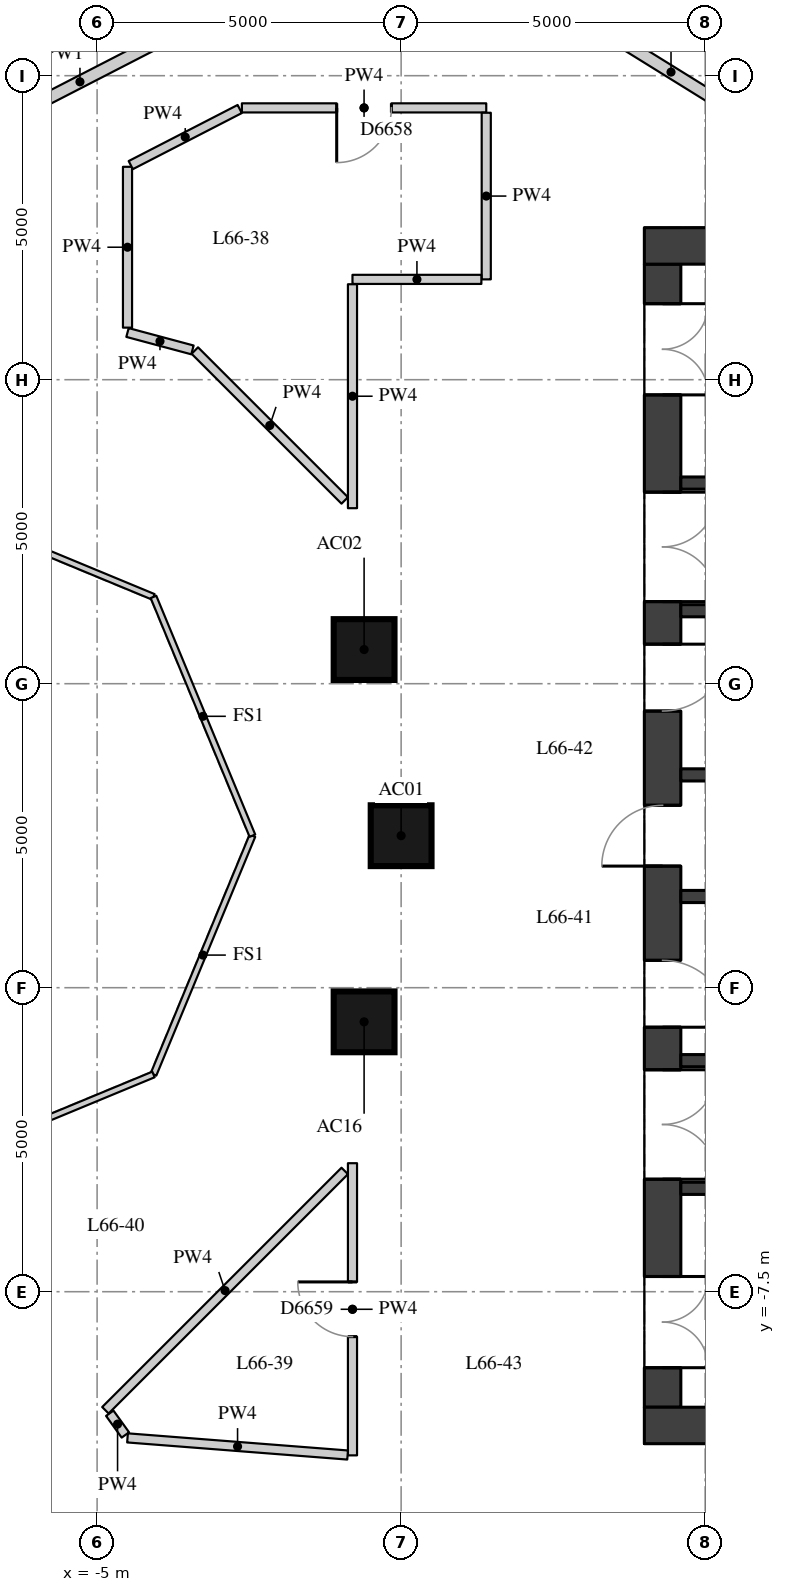
"""IFC4 building model, lengths in metres.
Left out: names, types, materials, properties, quantities, classifications, styles, units other than length and angle.
Written with IfcOpenShell. Run it as: python <this file> out.ifc"""

import sys

from ifc_helpers import new_model, si_unit, direction, frame, frame_2d, origin, origin_2d, place, context, subcontext, project, spatial, rectangle, extrude, element, fill, save


model = new_model("IFC4")
c1 = context("Model", 3, precision=1e-05, world=origin(), true_north=direction((0.0, 1.0)))
c2 = subcontext(c1, "Body", "Model", "MODEL_VIEW")
j1 = project(units=[si_unit("LENGTHUNIT", "METRE"), si_unit("PLANEANGLEUNIT", "RADIAN")], contexts=[c1])
p1 = place(None, origin())
s1 = spatial("IfcSite", under=j1, at=p1, CompositionType="ELEMENT")
p2 = place(p1, origin())
s2 = spatial("IfcBuilding", under=s1, at=p2, CompositionType="ELEMENT")
p3 = place(p2, frame((0.0, 0.0, 233.3)))
s3 = spatial("IfcBuildingStorey", under=s2, at=p3, CompositionType="ELEMENT", Elevation=233.3)
for number, where, z_axis, x_axis in (
    (1, (0.0, 0.0, 0.0), (0.0, 0.0, 1.0), (1.0, 0.0, 0.0)),
    (2, (-0.609, 3.062, 0.0), (0.0, 0.0, 1.0), (1.0, 0.0, 0.0)),
    (3, (-0.609, -3.062, 0.0), (0.0, 0.0, 1.0), (1.0, 0.0, 0.0)),
):
    element("IfcColumn", number, at=place(p3, frame(where, z_axis=z_axis, x_axis=x_axis)), inside=s3, PredefinedType="COLUMN", context=c2, shape_type="SweptSolid", body=[
        extrude(rectangle(XDim=1.0, YDim=1.0, at=origin_2d()), origin(), (0.0, 0.0, 1.0), 3.3),
    ])
p4 = place(p3, frame((4.3, -9.4, 0.0), z_axis=(0.0, 0.0, 1.0), x_axis=(0.0, 1.0, 0.0)))
e4 = element("IfcWall", 4, at=p4, inside=s3, PredefinedType="SHEAR", context=c2, shape_type="SweptSolid", body=[
    extrude(rectangle(XDim=18.8, YDim=0.6, at=frame_2d((9.4, 0.0))), origin(), (0.0, 0.0, 1.0), 3.02),
])
p5 = place(p4, frame((0.65, 0.0, 0.0)))
e5 = element("IfcOpeningElement", 5, at=p5, cuts=e4, PredefinedType="OPENING", context=c2, shape_type="SweptSolid", body=[
    extrude(rectangle(XDim=1.5, YDim=2.1, at=frame_2d((0.75, 1.05))), frame((0.0, 0.31, 0.0), z_axis=(0.0, -1.0, 0.0), x_axis=(1.0, 0.0, 0.0)), (0.0, 0.0, 1.0), 0.62),
])
p6 = place(p4, frame((3.75, 0.0, 0.0)))
e6 = element("IfcOpeningElement", 6, at=p6, cuts=e4, PredefinedType="OPENING", context=c2, shape_type="SweptSolid", body=[
    extrude(rectangle(XDim=1.8, YDim=2.1, at=frame_2d((0.9, 1.05))), frame((0.0, 0.31, 0.0), z_axis=(0.0, -1.0, 0.0), x_axis=(1.0, 0.0, 0.0)), (0.0, 0.0, 1.0), 0.62),
])
p7 = place(p4, frame((6.25, 0.0, 0.0)))
e7 = element("IfcOpeningElement", 7, at=p7, cuts=e4, PredefinedType="OPENING", context=c2, shape_type="SweptSolid", body=[
    extrude(rectangle(XDim=1.1, YDim=2.1, at=frame_2d((0.55, 1.05))), frame((0.0, 0.31, 0.0), z_axis=(0.0, -1.0, 0.0), x_axis=(1.0, 0.0, 0.0)), (0.0, 0.0, 1.0), 0.62),
])
p8 = place(p4, frame((8.9, 0.0, 0.0)))
e8 = element("IfcOpeningElement", 8, at=p8, cuts=e4, PredefinedType="OPENING", context=c2, shape_type="SweptSolid", body=[
    extrude(rectangle(XDim=1.0, YDim=2.1, at=frame_2d((0.5, 1.05))), frame((0.0, 0.31, 0.0), z_axis=(0.0, -1.0, 0.0), x_axis=(1.0, 0.0, 0.0)), (0.0, 0.0, 1.0), 0.62),
])
p9 = place(p4, frame((11.45, 0.0, 0.0)))
e9 = element("IfcOpeningElement", 9, at=p9, cuts=e4, PredefinedType="OPENING", context=c2, shape_type="SweptSolid", body=[
    extrude(rectangle(XDim=1.1, YDim=2.1, at=frame_2d((0.55, 1.05))), frame((0.0, 0.31, 0.0), z_axis=(0.0, -1.0, 0.0), x_axis=(1.0, 0.0, 0.0)), (0.0, 0.0, 1.0), 0.62),
])
p10 = place(p4, frame((13.25, 0.0, 0.0)))
e10 = element("IfcOpeningElement", 10, at=p10, cuts=e4, PredefinedType="OPENING", context=c2, shape_type="SweptSolid", body=[
    extrude(rectangle(XDim=1.8, YDim=2.1, at=frame_2d((0.9, 1.05))), frame((0.0, 0.31, 0.0), z_axis=(0.0, -1.0, 0.0), x_axis=(1.0, 0.0, 0.0)), (0.0, 0.0, 1.0), 0.62),
])
p11 = place(p4, frame((16.65, 0.0, 0.0)))
e11 = element("IfcOpeningElement", 11, at=p11, cuts=e4, PredefinedType="OPENING", context=c2, shape_type="SweptSolid", body=[
    extrude(rectangle(XDim=1.5, YDim=2.1, at=frame_2d((0.75, 1.05))), frame((0.0, 0.31, 0.0), z_axis=(0.0, -1.0, 0.0), x_axis=(1.0, 0.0, 0.0)), (0.0, 0.0, 1.0), 0.62),
])
for number, where, z_axis, x_axis in (
    (12, (4.0, 9.7, 0.0), (0.0, 0.0, 1.0), (1.0, 0.0, 0.0)),
    (13, (4.0, -9.7, 0.0), (0.0, 0.0, 1.0), (1.0, 0.0, 0.0)),
):
    element("IfcWall", number, at=place(p3, frame(where, z_axis=z_axis, x_axis=x_axis)), inside=s3, PredefinedType="SHEAR", context=c2, shape_type="SweptSolid", body=[
        extrude(rectangle(XDim=12.0, YDim=0.6, at=frame_2d((6.0, 0.0))), origin(), (0.0, 0.0, 1.0), 3.02),
    ])
p12 = place(p3, frame((4.6, 5.8, 0.0), z_axis=(0.0, 0.0, 1.0), x_axis=(1.0, 0.0, 0.0)))
e14 = element("IfcWall", 14, at=p12, inside=s3, PredefinedType="SHEAR", context=c2, shape_type="SweptSolid", body=[
    extrude(rectangle(XDim=10.8, YDim=0.2, at=frame_2d((5.4, 0.0))), origin(), (0.0, 0.0, 1.0), 3.02),
])
p13 = place(p12, frame((7.05, 0.0, 0.0)))
e15 = element("IfcOpeningElement", 15, at=p13, cuts=e14, PredefinedType="OPENING", context=c2, shape_type="SweptSolid", body=[
    extrude(rectangle(XDim=1.1, YDim=2.1, at=frame_2d((0.55, 1.05))), frame((0.0, 0.11, 0.0), z_axis=(0.0, -1.0, 0.0), x_axis=(1.0, 0.0, 0.0)), (0.0, 0.0, 1.0), 0.22),
])
p14 = place(p12, frame((9.05, 0.0, 0.0)))
e16 = element("IfcOpeningElement", 16, at=p14, cuts=e14, PredefinedType="OPENING", context=c2, shape_type="SweptSolid", body=[
    extrude(rectangle(XDim=1.1, YDim=2.1, at=frame_2d((0.55, 1.05))), frame((0.0, 0.11, 0.0), z_axis=(0.0, -1.0, 0.0), x_axis=(1.0, 0.0, 0.0)), (0.0, 0.0, 1.0), 0.22),
])
p15 = place(p3, frame((4.6, 3.7, 0.0), z_axis=(0.0, 0.0, 1.0), x_axis=(1.0, 0.0, 0.0)))
e17 = element("IfcWall", 17, at=p15, inside=s3, PredefinedType="SHEAR", context=c2, shape_type="SweptSolid", body=[
    extrude(rectangle(XDim=10.8, YDim=0.2, at=frame_2d((5.4, 0.0))), origin(), (0.0, 0.0, 1.0), 3.02),
])
p16 = place(p15, frame((6.6, 0.0, 0.0)))
e18 = element("IfcOpeningElement", 18, at=p16, cuts=e17, PredefinedType="OPENING", context=c2, shape_type="SweptSolid", body=[
    extrude(rectangle(XDim=1.1, YDim=2.1, at=frame_2d((0.55, 1.05))), frame((0.0, 0.11, 0.0), z_axis=(0.0, -1.0, 0.0), x_axis=(1.0, 0.0, 0.0)), (0.0, 0.0, 1.0), 0.22),
])
p17 = place(p15, frame((8.9, 0.0, 0.0)))
e19 = element("IfcOpeningElement", 19, at=p17, cuts=e17, PredefinedType="OPENING", context=c2, shape_type="SweptSolid", body=[
    extrude(rectangle(XDim=1.1, YDim=2.1, at=frame_2d((0.55, 1.05))), frame((0.0, 0.11, 0.0), z_axis=(0.0, -1.0, 0.0), x_axis=(1.0, 0.0, 0.0)), (0.0, 0.0, 1.0), 0.22),
])
for number, where, z_axis, x_axis in (
    (20, (4.6, 1.0, 0.0), (0.0, 0.0, 1.0), (1.0, 0.0, 0.0)),
    (21, (4.6, -1.0, 0.0), (0.0, 0.0, 1.0), (1.0, 0.0, 0.0)),
):
    element("IfcWall", number, at=place(p3, frame(where, z_axis=z_axis, x_axis=x_axis)), inside=s3, PredefinedType="SHEAR", context=c2, shape_type="SweptSolid", body=[
        extrude(rectangle(XDim=10.8, YDim=0.2, at=frame_2d((5.4, 0.0))), origin(), (0.0, 0.0, 1.0), 3.02),
    ])
p18 = place(p3, frame((4.6, -3.7, 0.0), z_axis=(0.0, 0.0, 1.0), x_axis=(1.0, 0.0, 0.0)))
e22 = element("IfcWall", 22, at=p18, inside=s3, PredefinedType="SHEAR", context=c2, shape_type="SweptSolid", body=[
    extrude(rectangle(XDim=10.8, YDim=0.2, at=frame_2d((5.4, 0.0))), origin(), (0.0, 0.0, 1.0), 3.02),
])
p19 = place(p18, frame((6.6, 0.0, 0.0)))
e23 = element("IfcOpeningElement", 23, at=p19, cuts=e22, PredefinedType="OPENING", context=c2, shape_type="SweptSolid", body=[
    extrude(rectangle(XDim=1.1, YDim=2.1, at=frame_2d((0.55, 1.05))), frame((0.0, 0.11, 0.0), z_axis=(0.0, -1.0, 0.0), x_axis=(1.0, 0.0, 0.0)), (0.0, 0.0, 1.0), 0.22),
])
p20 = place(p18, frame((8.9, 0.0, 0.0)))
e24 = element("IfcOpeningElement", 24, at=p20, cuts=e22, PredefinedType="OPENING", context=c2, shape_type="SweptSolid", body=[
    extrude(rectangle(XDim=1.1, YDim=2.1, at=frame_2d((0.55, 1.05))), frame((0.0, 0.11, 0.0), z_axis=(0.0, -1.0, 0.0), x_axis=(1.0, 0.0, 0.0)), (0.0, 0.0, 1.0), 0.22),
])
p21 = place(p3, frame((4.6, -5.8, 0.0), z_axis=(0.0, 0.0, 1.0), x_axis=(1.0, 0.0, 0.0)))
e25 = element("IfcWall", 25, at=p21, inside=s3, PredefinedType="SHEAR", context=c2, shape_type="SweptSolid", body=[
    extrude(rectangle(XDim=10.8, YDim=0.2, at=frame_2d((5.4, 0.0))), origin(), (0.0, 0.0, 1.0), 3.02),
])
p22 = place(p3, frame((-7.557, 11.227, 0.0), z_axis=(0.0, 0.0, 1.0), x_axis=(0.889060449642, 0.457789817364, 0.0)))
e26 = element("IfcWall", 26, at=p22, inside=s3, PredefinedType="PARTITIONING", context=c2, shape_type="SweptSolid", body=[
    extrude(rectangle(XDim=5.119, YDim=0.2, at=frame_2d((2.559, 0.0))), origin(), (0.0, 0.0, 1.0), 3.02),
])
p23 = place(p3, frame((2.892, 13.518, 0.0), z_axis=(0.0, 0.0, 1.0), x_axis=(0.849866037624, -0.526998783769, 0.0)))
e27 = element("IfcWall", 27, at=p23, inside=s3, PredefinedType="PARTITIONING", context=c2, shape_type="SweptSolid", body=[
    extrude(rectangle(XDim=3.639, YDim=0.2, at=frame_2d((1.82, 0.0))), origin(), (0.0, 0.0, 1.0), 3.02),
])
p24 = place(p3, frame((-2.619, 11.97, 0.0), z_axis=(0.0, 0.0, 1.0), x_axis=(1.0, 0.0, 0.0)))
e28 = element("IfcWall", 28, at=p24, inside=s3, PredefinedType="PARTITIONING", context=c2, shape_type="SweptSolid", body=[
    extrude(rectangle(XDim=4.019, YDim=0.15, at=frame_2d((2.009, 0.0))), origin(), (0.0, 0.0, 1.0), 3.02),
])
p25 = place(p24, frame((1.559, 0.0, 0.0)))
e29 = element("IfcOpeningElement", 29, at=p25, cuts=e28, PredefinedType="OPENING", context=c2, shape_type="SweptSolid", body=[
    extrude(rectangle(XDim=0.9, YDim=2.1, at=frame_2d((0.45, 1.05))), frame((0.0, 0.085, 0.0), z_axis=(0.0, -1.0, 0.0), x_axis=(1.0, 0.0, 0.0)), (0.0, 0.0, 1.0), 0.17),
])
p26 = place(p3, frame((1.4, 11.89, 0.0), z_axis=(0.0, 0.0, 1.0), x_axis=(0.0, -1.0, 0.0)))
e30 = element("IfcWall", 30, at=p26, inside=s3, PredefinedType="PARTITIONING", context=c2, shape_type="SweptSolid", body=[
    extrude(rectangle(XDim=2.74, YDim=0.15, at=frame_2d((1.37, 0.0))), origin(), (0.0, 0.0, 1.0), 3.02),
])
p27 = place(p3, frame((1.32, 9.15, 0.0), z_axis=(0.0, 0.0, 1.0), x_axis=(-1.0, 0.0, 0.0)))
e31 = element("IfcWall", 31, at=p27, inside=s3, PredefinedType="PARTITIONING", context=c2, shape_type="SweptSolid", body=[
    extrude(rectangle(XDim=2.12, YDim=0.15, at=frame_2d((1.06, 0.0))), origin(), (0.0, 0.0, 1.0), 3.02),
])
p28 = place(p3, frame((-0.8, 9.07, 0.0), z_axis=(0.0, 0.0, 1.0), x_axis=(0.0, -1.0, 0.0)))
e32 = element("IfcWall", 32, at=p28, inside=s3, PredefinedType="PARTITIONING", context=c2, shape_type="SweptSolid", body=[
    extrude(rectangle(XDim=3.683, YDim=0.15, at=frame_2d((1.842, 0.0))), origin(), (0.0, 0.0, 1.0), 3.02),
])
p29 = place(p3, frame((-0.927, 5.514, 0.0), z_axis=(0.0, 0.0, 1.0), x_axis=(-0.707106781187, 0.707106781187, 0.0)))
e33 = element("IfcWall", 33, at=p29, inside=s3, PredefinedType="PARTITIONING", context=c2, shape_type="SweptSolid", body=[
    extrude(rectangle(XDim=3.487, YDim=0.15, at=frame_2d((1.743, 0.0))), origin(), (0.0, 0.0, 1.0), 3.02),
])
p30 = place(p3, frame((-3.432, 7.99, 0.0), z_axis=(0.0, 0.0, 1.0), x_axis=(-0.965900750832, 0.258912609855, 0.0)))
e34 = element("IfcWall", 34, at=p30, inside=s3, PredefinedType="PARTITIONING", context=c2, shape_type="SweptSolid", body=[
    extrude(rectangle(XDim=1.106, YDim=0.15, at=frame_2d((0.553, 0.0))), origin(), (0.0, 0.0, 1.0), 3.02),
])
p31 = place(p3, frame((-4.5, 8.356, 0.0), z_axis=(0.0, 0.0, 1.0), x_axis=(0.0, 1.0, 0.0)))
e35 = element("IfcWall", 35, at=p31, inside=s3, PredefinedType="PARTITIONING", context=c2, shape_type="SweptSolid", body=[
    extrude(rectangle(XDim=2.645, YDim=0.15, at=frame_2d((1.323, 0.0))), origin(), (0.0, 0.0, 1.0), 3.02),
])
p32 = place(p3, frame((-4.447, 11.029, 0.0), z_axis=(0.0, 0.0, 1.0), x_axis=(0.88908361723, 0.457744821459, 0.0)))
e36 = element("IfcWall", 36, at=p32, inside=s3, PredefinedType="PARTITIONING", context=c2, shape_type="SweptSolid", body=[
    extrude(rectangle(XDim=2.016, YDim=0.15, at=frame_2d((1.008, 0.0))), origin(), (0.0, 0.0, 1.0), 3.02),
])
p33 = place(p3, frame((-0.8, -5.386, 0.0), z_axis=(0.0, 0.0, 1.0), x_axis=(0.0, -1.0, 0.0)))
e37 = element("IfcWall", 37, at=p33, inside=s3, PredefinedType="PARTITIONING", context=c2, shape_type="SweptSolid", body=[
    extrude(rectangle(XDim=4.805, YDim=0.15, at=frame_2d((2.403, 0.0))), origin(), (0.0, 0.0, 1.0), 3.02),
])
p34 = place(p33, frame((1.953, 0.0, 0.0)))
e38 = element("IfcOpeningElement", 38, at=p34, cuts=e37, PredefinedType="OPENING", context=c2, shape_type="SweptSolid", body=[
    extrude(rectangle(XDim=0.9, YDim=2.1, at=frame_2d((0.45, 1.05))), frame((0.0, 0.085, 0.0), z_axis=(0.0, -1.0, 0.0), x_axis=(1.0, 0.0, 0.0)), (0.0, 0.0, 1.0), 0.17),
])
p35 = place(p3, frame((-0.88, -10.186, 0.0), z_axis=(0.0, 0.0, 1.0), x_axis=(-0.996990060313, 0.077529475925, 0.0)))
e39 = element("IfcWall", 39, at=p35, inside=s3, PredefinedType="PARTITIONING", context=c2, shape_type="SweptSolid", body=[
    extrude(rectangle(XDim=3.631, YDim=0.15, at=frame_2d((1.815, 0.0))), origin(), (0.0, 0.0, 1.0), 3.02),
])
p36 = place(p3, frame((-4.535, -9.856, 0.0), z_axis=(0.0, 0.0, 1.0), x_axis=(-0.583807558681, 0.811892070676, 0.0)))
e40 = element("IfcWall", 40, at=p36, inside=s3, PredefinedType="PARTITIONING", context=c2, shape_type="SweptSolid", body=[
    extrude(rectangle(XDim=0.44, YDim=0.15, at=frame_2d((0.22, 0.0))), origin(), (0.0, 0.0, 1.0), 3.02),
])
p37 = place(p3, frame((-4.864, -9.45, 0.0), z_axis=(0.0, 0.0, 1.0), x_axis=(0.707106781187, 0.707106781187, 0.0)))
e41 = element("IfcWall", 41, at=p37, inside=s3, PredefinedType="PARTITIONING", context=c2, shape_type="SweptSolid", body=[
    extrude(rectangle(XDim=5.566, YDim=0.15, at=frame_2d((2.783, 0.0))), origin(), (0.0, 0.0, 1.0), 3.02),
])
for number, where, z_axis, x_axis in (
    (42, (-2.446, 0.0, 0.0), (0.0, 0.0, 1.0), (-0.383, -0.924, 0.0)),
    (43, (-4.073, -3.927, 0.0), (0.0, 0.0, 1.0), (-0.924, -0.383, 0.0)),
    (44, (-8.0, 5.554, 0.0), (0.0, 0.0, 1.0), (0.924, -0.383, 0.0)),
    (45, (-4.073, 3.927, 0.0), (0.0, 0.0, 1.0), (0.383, -0.924, 0.0)),
):
    element("IfcWall", number, at=place(p3, frame(where, z_axis=z_axis, x_axis=x_axis)), inside=s3, PredefinedType="PARTITIONING", context=c2, shape_type="SweptSolid", body=[
        extrude(rectangle(XDim=4.251, YDim=0.1, at=frame_2d((2.125, 0.0))), origin(), (0.0, 0.0, 1.0), 3.02),
    ])
p38 = place(p5, origin())
e46 = element("IfcDoor", 46, at=p38, inside=s3, OperationType="DOUBLE_DOOR_SINGLE_SWING", PredefinedType="DOOR", context=c2, shape_type="SweptSolid", body=[
    extrude(rectangle(XDim=1.5, YDim=2.1, at=frame_2d((0.75, 1.05))), frame((0.0, 0.025, 0.0), z_axis=(0.0, -1.0, 0.0), x_axis=(1.0, 0.0, 0.0)), (0.0, 0.0, 1.0), 0.05),
])
fill(e5, e46)
p39 = place(p6, origin())
e47 = element("IfcDoor", 47, at=p39, inside=s3, OperationType="DOUBLE_DOOR_SINGLE_SWING", PredefinedType="DOOR", context=c2, shape_type="SweptSolid", body=[
    extrude(rectangle(XDim=1.8, YDim=2.1, at=frame_2d((0.9, 1.05))), frame((0.0, 0.025, 0.0), z_axis=(0.0, -1.0, 0.0), x_axis=(1.0, 0.0, 0.0)), (0.0, 0.0, 1.0), 0.05),
])
fill(e6, e47)
p40 = place(p7, origin())
e48 = element("IfcDoor", 48, at=p40, inside=s3, OperationType="SINGLE_SWING_RIGHT", PredefinedType="DOOR", context=c2, shape_type="SweptSolid", body=[
    extrude(rectangle(XDim=1.1, YDim=2.1, at=frame_2d((0.55, 1.05))), frame((0.0, 0.025, 0.0), z_axis=(0.0, -1.0, 0.0), x_axis=(1.0, 0.0, 0.0)), (0.0, 0.0, 1.0), 0.05),
])
fill(e7, e48)
p41 = place(p8, origin())
e49 = element("IfcDoor", 49, at=p41, inside=s3, OperationType="SINGLE_SWING_LEFT", PredefinedType="DOOR", context=c2, shape_type="SweptSolid", body=[
    extrude(rectangle(XDim=1.0, YDim=2.1, at=frame_2d((0.5, 1.05))), frame((0.0, 0.025, 0.0), z_axis=(0.0, -1.0, 0.0), x_axis=(1.0, 0.0, 0.0)), (0.0, 0.0, 1.0), 0.05),
])
fill(e8, e49)
p42 = place(p9, origin())
e50 = element("IfcDoor", 50, at=p42, inside=s3, OperationType="SINGLE_SWING_LEFT", PredefinedType="DOOR", context=c2, shape_type="SweptSolid", body=[
    extrude(rectangle(XDim=1.1, YDim=2.1, at=frame_2d((0.55, 1.05))), frame((0.0, 0.025, 0.0), z_axis=(0.0, -1.0, 0.0), x_axis=(1.0, 0.0, 0.0)), (0.0, 0.0, 1.0), 0.05),
])
fill(e9, e50)
p43 = place(p10, origin())
e51 = element("IfcDoor", 51, at=p43, inside=s3, OperationType="DOUBLE_DOOR_SINGLE_SWING", PredefinedType="DOOR", context=c2, shape_type="SweptSolid", body=[
    extrude(rectangle(XDim=1.8, YDim=2.1, at=frame_2d((0.9, 1.05))), frame((0.0, 0.025, 0.0), z_axis=(0.0, -1.0, 0.0), x_axis=(1.0, 0.0, 0.0)), (0.0, 0.0, 1.0), 0.05),
])
fill(e10, e51)
p44 = place(p11, origin())
e52 = element("IfcDoor", 52, at=p44, inside=s3, OperationType="DOUBLE_DOOR_SINGLE_SWING", PredefinedType="DOOR", context=c2, shape_type="SweptSolid", body=[
    extrude(rectangle(XDim=1.5, YDim=2.1, at=frame_2d((0.75, 1.05))), frame((0.0, 0.025, 0.0), z_axis=(0.0, -1.0, 0.0), x_axis=(1.0, 0.0, 0.0)), (0.0, 0.0, 1.0), 0.05),
])
fill(e11, e52)
p45 = place(p25, origin())
e53 = element("IfcDoor", 53, at=p45, inside=s3, OperationType="SINGLE_SWING_RIGHT", PredefinedType="DOOR", context=c2, shape_type="SweptSolid", body=[
    extrude(rectangle(XDim=0.9, YDim=2.1, at=frame_2d((0.45, 1.05))), frame((0.0, 0.025, 0.0), z_axis=(0.0, -1.0, 0.0), x_axis=(1.0, 0.0, 0.0)), (0.0, 0.0, 1.0), 0.05),
])
fill(e29, e53)
p46 = place(p34, origin())
e54 = element("IfcDoor", 54, at=p46, inside=s3, OperationType="SINGLE_SWING_RIGHT", PredefinedType="DOOR", context=c2, shape_type="SweptSolid", body=[
    extrude(rectangle(XDim=0.9, YDim=2.1, at=frame_2d((0.45, 1.05))), frame((0.0, 0.025, 0.0), z_axis=(0.0, -1.0, 0.0), x_axis=(1.0, 0.0, 0.0)), (0.0, 0.0, 1.0), 0.05),
])
fill(e38, e54)
save(model, sys.argv[1])
